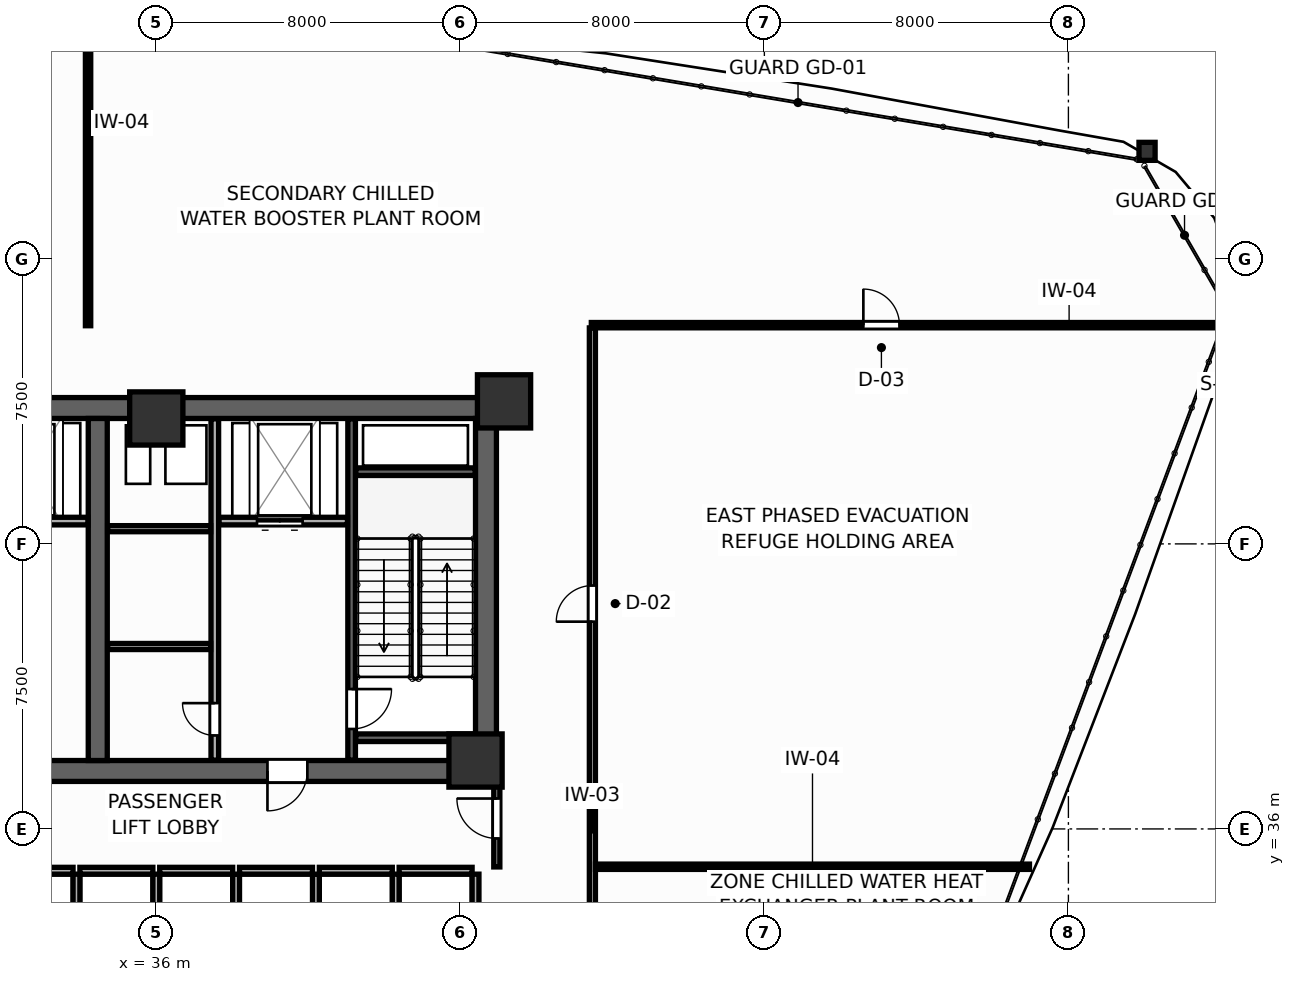
"""IFC4 building model, lengths in metres.
Left out: names, types, materials, properties, quantities, classifications, styles, units other than length and angle.
Written with IfcOpenShell. Run it as: python <this file> out.ifc"""

import sys

from ifc_helpers import new_model, si_unit, direction, frame, frame_2d, origin, origin_2d, place, context, subcontext, project, spatial, rectangle, i_section, extrude, source, transform, mapped, element, fill, save


model = new_model("IFC4")
c1 = context("Model", 3, precision=1e-05, world=origin(), true_north=direction((0.0, 1.0)))
c2 = subcontext(c1, "Body", "Model", "MODEL_VIEW")
j1 = project(units=[si_unit("LENGTHUNIT", "METRE"), si_unit("PLANEANGLEUNIT", "RADIAN")], contexts=[c1])
p1 = place(None, origin())
s1 = spatial("IfcSite", under=j1, at=p1, CompositionType="ELEMENT")
p2 = place(p1, origin())
s2 = spatial("IfcBuilding", under=s1, at=p2, CompositionType="ELEMENT")
p3 = place(p2, frame((0.0, 0.0, 59.1)))
s3 = spatial("IfcBuildingStorey", under=s2, at=p3, CompositionType="ELEMENT", Elevation=59.1)
p4 = place(p3, frame((27.05, 47.075, 0.0), z_axis=(0.0, 0.0, 1.0), x_axis=(1.0, 0.0, 0.0)))
e1 = element("IfcWall", 1, at=p4, inside=s3, PredefinedType="SHEAR", context=c2, shape_type="SweptSolid", body=[
    extrude(rectangle(XDim=17.9, YDim=0.55, at=frame_2d((8.95, 0.0))), origin(), (0.0, 0.0, 1.0), 4.8),
])
p5 = place(p3, frame((27.05, 37.525, 0.0), z_axis=(0.0, 0.0, 1.0), x_axis=(1.0, 0.0, 0.0)))
e2 = element("IfcWall", 2, at=p5, inside=s3, PredefinedType="SHEAR", context=c2, shape_type="SweptSolid", body=[
    extrude(rectangle(XDim=17.9, YDim=0.55, at=frame_2d((8.95, 0.0))), origin(), (0.0, 0.0, 1.0), 4.8),
])
p6 = place(p5, frame((4.975, 0.0, 0.0)))
e3 = element("IfcOpeningElement", 3, at=p6, cuts=e2, PredefinedType="OPENING", context=c2, shape_type="SweptSolid", body=[
    extrude(rectangle(XDim=1.05, YDim=2.1, at=frame_2d((0.525, 1.05))), frame((0.0, 0.285, 0.0), z_axis=(0.0, -1.0, 0.0), x_axis=(1.0, 0.0, 0.0)), (0.0, 0.0, 1.0), 0.57),
])
p7 = place(p5, frame((11.875, 0.0, 0.0)))
e4 = element("IfcOpeningElement", 4, at=p7, cuts=e2, PredefinedType="OPENING", context=c2, shape_type="SweptSolid", body=[
    extrude(rectangle(XDim=1.05, YDim=2.1, at=frame_2d((0.525, 1.05))), frame((0.0, 0.285, 0.0), z_axis=(0.0, -1.0, 0.0), x_axis=(1.0, 0.0, 0.0)), (0.0, 0.0, 1.0), 0.57),
])
p8 = place(p3, frame((44.675, 37.8, 0.0), z_axis=(0.0, 0.0, 1.0), x_axis=(0.0, 1.0, 0.0)))
e5 = element("IfcWall", 5, at=p8, inside=s3, PredefinedType="SHEAR", context=c2, shape_type="SweptSolid", body=[
    extrude(rectangle(XDim=9.0, YDim=0.55, at=frame_2d((4.5, 0.0))), origin(), (0.0, 0.0, 1.0), 4.8),
])
p9 = place(p3, frame((34.46, 37.8, 0.0), z_axis=(0.0, 0.0, 1.0), x_axis=(0.0, 1.0, 0.0)))
e6 = element("IfcWall", 6, at=p9, inside=s3, PredefinedType="SHEAR", context=c2, shape_type="SweptSolid", body=[
    extrude(rectangle(XDim=9.0, YDim=0.5, at=frame_2d((4.5, 0.0))), origin(), (0.0, 0.0, 1.0), 4.58),
])
m1 = source(origin(), c2, "Body", "SweptSolid", [
    extrude(rectangle(XDim=1.4, YDim=1.4, at=origin_2d()), origin(), (0.0, 0.0, 1.0), 4.8),
])
for number, where, z_axis, x_axis in (
    (7, (45.15, 47.25, 0.0), (0.0, 0.0, 1.0), (1.0, 0.0, 0.0)),
    (8, (44.4, 37.8, 0.0), (0.0, 0.0, 1.0), (1.0, 0.0, 0.0)),
    (9, (36.0, 46.8, 0.0), (0.0, 0.0, 1.0), (1.0, 0.0, 0.0)),
):
    element("IfcColumn", number, at=place(p3, frame(where, z_axis=z_axis, x_axis=x_axis)), inside=s3, PredefinedType="COLUMN", context=c2, shape_type="MappedRepresentation", body=[
        mapped(m1, transform((0.0, 0.0, 0.0), scale=1.0)),
    ])
m2 = source(origin(), c2, "Body", "SweptSolid", [
    extrude(i_section(OverallWidth=0.424, OverallDepth=0.474, WebThickness=0.045, FlangeThickness=0.072, FilletRadius=0.015, at=origin_2d()), origin(), (0.0, 0.0, 1.0), 4.8),
])
p10 = place(p3, frame((62.069, 53.829, 0.0), z_axis=(0.0, 0.0, 1.0), x_axis=(1.0, 0.0, 0.0)))
e10 = element("IfcColumn", 10, at=p10, inside=s3, PredefinedType="COLUMN", context=c2, shape_type="MappedRepresentation", body=[
    mapped(m2, transform((0.0, 0.0, 0.0), scale=1.0)),
])
p11 = place(p3, frame((41.14, 37.81, 0.0), z_axis=(0.0, 0.0, 1.0), x_axis=(0.0, 1.0, 0.0)))
e11 = element("IfcWall", 11, at=p11, inside=s3, PredefinedType="SHEAR", context=c2, shape_type="SweptSolid", body=[
    extrude(rectangle(XDim=8.98, YDim=0.2, at=frame_2d((4.49, 0.0))), origin(), (0.0, 0.0, 1.0), 4.8),
])
p12 = place(p11, frame((0.82, 0.0, 0.0)))
e12 = element("IfcOpeningElement", 12, at=p12, cuts=e11, PredefinedType="OPENING", context=c2, shape_type="SweptSolid", body=[
    extrude(rectangle(XDim=1.05, YDim=2.1, at=frame_2d((0.525, 1.05))), frame((0.0, 0.11, 0.0), z_axis=(0.0, -1.0, 0.0), x_axis=(1.0, 0.0, 0.0)), (0.0, 0.0, 1.0), 0.22),
])
for number, where, z_axis, x_axis in (
    (13, (41.25, 45.4, 0.0), (0.0, 0.0, 1.0), (1.0, 0.0, 0.0)),
    (14, (41.25, 38.4, 0.0), (0.0, 0.0, 1.0), (1.0, 0.0, 0.0)),
):
    element("IfcWall", number, at=place(p3, frame(where, z_axis=z_axis, x_axis=x_axis)), inside=s3, PredefinedType="SHEAR", context=c2, shape_type="SweptSolid", body=[
        extrude(rectangle(XDim=3.14, YDim=0.2, at=frame_2d((1.57, 0.0))), origin(), (0.0, 0.0, 1.0), 4.8),
    ])
p13 = place(p3, frame((30.97, 44.1, 0.0), z_axis=(0.0, 0.0, 1.0), x_axis=(1.0, 0.0, 0.0)))
e15 = element("IfcWall", 15, at=p13, inside=s3, PredefinedType="PARTITIONING", context=c2, shape_type="SweptSolid", body=[
    extrude(rectangle(XDim=3.23, YDim=0.2, at=frame_2d((1.615, 0.0))), origin(), (0.0, 0.0, 1.0), 4.58),
])
p14 = place(p13, frame((0.9, 0.0, 0.0)))
e16 = element("IfcOpeningElement", 16, at=p14, cuts=e15, PredefinedType="OPENING", context=c2, shape_type="SweptSolid", body=[
    extrude(rectangle(XDim=1.2, YDim=2.1, at=frame_2d((0.6, 1.05))), frame((0.0, 0.11, 0.0), z_axis=(0.0, -1.0, 0.0), x_axis=(1.0, 0.0, 0.0)), (0.0, 0.0, 1.0), 0.22),
])
p15 = place(p3, frame((37.65, 44.1, 0.0), z_axis=(0.0, 0.0, 1.0), x_axis=(1.0, 0.0, 0.0)))
e17 = element("IfcWall", 17, at=p15, inside=s3, PredefinedType="PARTITIONING", context=c2, shape_type="SweptSolid", body=[
    extrude(rectangle(XDim=3.38, YDim=0.2, at=frame_2d((1.69, 0.0))), origin(), (0.0, 0.0, 1.0), 4.58),
])
p16 = place(p15, frame((1.0, 0.0, 0.0)))
e18 = element("IfcOpeningElement", 18, at=p16, cuts=e17, PredefinedType="OPENING", context=c2, shape_type="SweptSolid", body=[
    extrude(rectangle(XDim=1.2, YDim=2.1, at=frame_2d((0.6, 1.05))), frame((0.0, 0.11, 0.0), z_axis=(0.0, -1.0, 0.0), x_axis=(1.0, 0.0, 0.0)), (0.0, 0.0, 1.0), 0.22),
])
p17 = place(p3, frame((37.54, 37.81, 0.0), z_axis=(0.0, 0.0, 1.0), x_axis=(0.0, 1.0, 0.0)))
e19 = element("IfcWall", 19, at=p17, inside=s3, PredefinedType="PARTITIONING", context=c2, shape_type="SweptSolid", body=[
    extrude(rectangle(XDim=8.98, YDim=0.2, at=frame_2d((4.49, 0.0))), origin(), (0.0, 0.0, 1.0), 4.58),
])
p18 = place(p17, frame((0.65, 0.0, 0.0)))
e20 = element("IfcOpeningElement", 20, at=p18, cuts=e19, PredefinedType="OPENING", context=c2, shape_type="SweptSolid", body=[
    extrude(rectangle(XDim=0.85, YDim=2.05, at=frame_2d((0.425, 1.025))), frame((0.0, 0.11, 0.0), z_axis=(0.0, -1.0, 0.0), x_axis=(1.0, 0.0, 0.0)), (0.0, 0.0, 1.0), 0.22),
])
for number, where, z_axis, x_axis in (
    (21, (34.72, 40.8, 0.0), (0.0, 0.0, 1.0), (1.0, 0.0, 0.0)),
    (22, (34.72, 43.9, 0.0), (0.0, 0.0, 1.0), (1.0, 0.0, 0.0)),
):
    element("IfcWall", number, at=place(p3, frame(where, z_axis=z_axis, x_axis=x_axis)), inside=s3, PredefinedType="PARTITIONING", context=c2, shape_type="SweptSolid", body=[
        extrude(rectangle(XDim=2.71, YDim=0.16, at=frame_2d((1.355, 0.0))), origin(), (0.0, 0.0, 1.0), 4.58),
    ])
p19 = place(p3, frame((31.89, 34.9, 0.0), z_axis=(0.0, 0.0, 1.0), x_axis=(1.0, 0.0, 0.0)))
e23 = element("IfcWall", 23, at=p19, inside=s3, PredefinedType="PARTITIONING", context=c2, shape_type="SweptSolid", body=[
    extrude(rectangle(XDim=1.92, YDim=0.18, at=frame_2d((0.96, 0.0))), origin(), (0.0, 0.0, 1.0), 4.58),
])
p20 = place(p3, frame((33.99, 34.9, 0.0), z_axis=(0.0, 0.0, 1.0), x_axis=(1.0, 0.0, 0.0)))
e24 = element("IfcWall", 24, at=p20, inside=s3, PredefinedType="PARTITIONING", context=c2, shape_type="SweptSolid", body=[
    extrude(rectangle(XDim=1.92, YDim=0.18, at=frame_2d((0.96, 0.0))), origin(), (0.0, 0.0, 1.0), 4.58),
])
p21 = place(p3, frame((33.9, 32.49, 0.0), z_axis=(0.0, 0.0, 1.0), x_axis=(0.0, 1.0, 0.0)))
e25 = element("IfcWall", 25, at=p21, inside=s3, PredefinedType="PARTITIONING", context=c2, shape_type="SweptSolid", body=[
    extrude(rectangle(XDim=2.32, YDim=0.18, at=frame_2d((1.16, 0.0))), origin(), (0.0, 0.0, 1.0), 4.58),
])
p22 = place(p3, frame((36.09, 34.9, 0.0), z_axis=(0.0, 0.0, 1.0), x_axis=(1.0, 0.0, 0.0)))
e26 = element("IfcWall", 26, at=p22, inside=s3, PredefinedType="PARTITIONING", context=c2, shape_type="SweptSolid", body=[
    extrude(rectangle(XDim=1.92, YDim=0.18, at=frame_2d((0.96, 0.0))), origin(), (0.0, 0.0, 1.0), 4.58),
])
p23 = place(p3, frame((36.0, 32.49, 0.0), z_axis=(0.0, 0.0, 1.0), x_axis=(0.0, 1.0, 0.0)))
e27 = element("IfcWall", 27, at=p23, inside=s3, PredefinedType="PARTITIONING", context=c2, shape_type="SweptSolid", body=[
    extrude(rectangle(XDim=2.32, YDim=0.18, at=frame_2d((1.16, 0.0))), origin(), (0.0, 0.0, 1.0), 4.58),
])
p24 = place(p3, frame((38.19, 34.9, 0.0), z_axis=(0.0, 0.0, 1.0), x_axis=(1.0, 0.0, 0.0)))
e28 = element("IfcWall", 28, at=p24, inside=s3, PredefinedType="PARTITIONING", context=c2, shape_type="SweptSolid", body=[
    extrude(rectangle(XDim=1.92, YDim=0.18, at=frame_2d((0.96, 0.0))), origin(), (0.0, 0.0, 1.0), 4.58),
])
p25 = place(p3, frame((38.1, 32.49, 0.0), z_axis=(0.0, 0.0, 1.0), x_axis=(0.0, 1.0, 0.0)))
e29 = element("IfcWall", 29, at=p25, inside=s3, PredefinedType="PARTITIONING", context=c2, shape_type="SweptSolid", body=[
    extrude(rectangle(XDim=2.32, YDim=0.18, at=frame_2d((1.16, 0.0))), origin(), (0.0, 0.0, 1.0), 4.58),
])
p26 = place(p3, frame((40.29, 34.9, 0.0), z_axis=(0.0, 0.0, 1.0), x_axis=(1.0, 0.0, 0.0)))
e30 = element("IfcWall", 30, at=p26, inside=s3, PredefinedType="PARTITIONING", context=c2, shape_type="SweptSolid", body=[
    extrude(rectangle(XDim=1.92, YDim=0.18, at=frame_2d((0.96, 0.0))), origin(), (0.0, 0.0, 1.0), 4.58),
])
p27 = place(p3, frame((40.2, 32.49, 0.0), z_axis=(0.0, 0.0, 1.0), x_axis=(0.0, 1.0, 0.0)))
e31 = element("IfcWall", 31, at=p27, inside=s3, PredefinedType="PARTITIONING", context=c2, shape_type="SweptSolid", body=[
    extrude(rectangle(XDim=2.32, YDim=0.18, at=frame_2d((1.16, 0.0))), origin(), (0.0, 0.0, 1.0), 4.58),
])
p28 = place(p3, frame((42.39, 34.9, 0.0), z_axis=(0.0, 0.0, 1.0), x_axis=(1.0, 0.0, 0.0)))
e32 = element("IfcWall", 32, at=p28, inside=s3, PredefinedType="PARTITIONING", context=c2, shape_type="SweptSolid", body=[
    extrude(rectangle(XDim=1.92, YDim=0.18, at=frame_2d((0.96, 0.0))), origin(), (0.0, 0.0, 1.0), 4.58),
])
for number, where, z_axis, x_axis in (
    (33, (42.3, 32.49, 0.0), (0.0, 0.0, 1.0), (0.0, 1.0, 0.0)),
    (34, (44.4, 32.49, 0.0), (0.0, 0.0, 1.0), (0.0, 1.0, 0.0)),
):
    element("IfcWall", number, at=place(p3, frame(where, z_axis=z_axis, x_axis=x_axis)), inside=s3, PredefinedType="PARTITIONING", context=c2, shape_type="SweptSolid", body=[
        extrude(rectangle(XDim=2.32, YDim=0.18, at=frame_2d((1.16, 0.0))), origin(), (0.0, 0.0, 1.0), 4.58),
    ])
p29 = place(p3, frame((44.96, 35.0, 0.0), z_axis=(0.0, 0.0, 1.0), x_axis=(0.0, 1.0, 0.0)))
e35 = element("IfcWall", 35, at=p29, inside=s3, PredefinedType="PARTITIONING", context=c2, shape_type="SweptSolid", body=[
    extrude(rectangle(XDim=2.65, YDim=0.16, at=frame_2d((1.325, 0.0))), origin(), (0.0, 0.0, 1.0), 4.58),
])
p30 = place(p29, frame((0.75, 0.0, 0.0)))
e36 = element("IfcOpeningElement", 36, at=p30, cuts=e35, PredefinedType="OPENING", context=c2, shape_type="SweptSolid", body=[
    extrude(rectangle(XDim=1.05, YDim=2.1, at=frame_2d((0.525, 1.05))), frame((0.0, 0.09, 0.0), z_axis=(0.0, -1.0, 0.0), x_axis=(1.0, 0.0, 0.0)), (0.0, 0.0, 1.0), 0.18),
])
p31 = place(p3, frame((47.475, 30.72, 0.0), z_axis=(0.0, 0.0, 1.0), x_axis=(0.0, 1.0, 0.0)))
e37 = element("IfcWall", 37, at=p31, inside=s3, PredefinedType="PARTITIONING", context=c2, shape_type="SweptSolid", body=[
    extrude(rectangle(XDim=18.463, YDim=0.16, at=frame_2d((9.231, 0.0))), origin(), (0.0, 0.0, 1.0), 4.58),
])
p32 = place(p31, frame((10.734, 0.0, 0.0)))
e38 = element("IfcOpeningElement", 38, at=p32, cuts=e37, PredefinedType="OPENING", context=c2, shape_type="SweptSolid", body=[
    extrude(rectangle(XDim=0.95, YDim=2.05, at=frame_2d((0.475, 1.025))), frame((0.0, 0.09, 0.0), z_axis=(0.0, -1.0, 0.0), x_axis=(1.0, 0.0, 0.0)), (0.0, 0.0, 1.0), 0.18),
])
p33 = place(p3, frame((47.447, 49.255, 0.0), z_axis=(0.0, 0.0, 1.0), x_axis=(1.0, 0.0, 0.0)))
e39 = element("IfcWall", 39, at=p33, inside=s3, PredefinedType="PARTITIONING", context=c2, shape_type="SweptSolid", body=[
    extrude(rectangle(XDim=16.855, YDim=0.14, at=frame_2d((8.428, 0.0))), origin(), (0.0, 0.0, 1.0), 2.57),
])
p34 = place(p33, frame((7.158, 0.0, 0.0)))
e40 = element("IfcOpeningElement", 40, at=p34, cuts=e39, PredefinedType="OPENING", context=c2, shape_type="SweptSolid", body=[
    extrude(rectangle(XDim=0.95, YDim=2.05, at=frame_2d((0.475, 1.025))), frame((0.0, 0.08, 0.0), z_axis=(0.0, -1.0, 0.0), x_axis=(1.0, 0.0, 0.0)), (0.0, 0.0, 1.0), 0.16),
])
p35 = place(p3, frame((47.557, 35.005, 0.0), z_axis=(0.0, 0.0, 1.0), x_axis=(1.0, 0.0, 0.0)))
e41 = element("IfcWall", 41, at=p35, inside=s3, PredefinedType="PARTITIONING", context=c2, shape_type="SweptSolid", body=[
    extrude(rectangle(XDim=11.419, YDim=0.14, at=frame_2d((5.709, 0.0))), origin(), (0.0, 0.0, 1.0), 4.58),
])
p36 = place(p3, frame((34.205, 49.24, 0.0), z_axis=(0.0, 0.0, 1.0), x_axis=(0.0, 1.0, 0.0)))
e42 = element("IfcWall", 42, at=p36, inside=s3, PredefinedType="PARTITIONING", context=c2, shape_type="SweptSolid", body=[
    extrude(rectangle(XDim=7.629, YDim=0.14, at=frame_2d((3.815, 0.0))), origin(), (0.0, 0.0, 1.0), 4.58),
])
p37 = place(p12, frame((1.05, 0.0, 0.0), z_axis=(0.0, 0.0, 1.0), x_axis=(-1.0, 0.0, 0.0)))
e43 = element("IfcDoor", 43, at=p37, inside=s3, OperationType="SINGLE_SWING_LEFT", PredefinedType="DOOR", context=c2, shape_type="SweptSolid", body=[
    extrude(rectangle(XDim=1.05, YDim=2.1, at=frame_2d((0.525, 1.05))), frame((0.0, 0.025, 0.0), z_axis=(0.0, -1.0, 0.0), x_axis=(1.0, 0.0, 0.0)), (0.0, 0.0, 1.0), 0.05),
])
fill(e12, e43)
p38 = place(p16, origin())
e44 = element("IfcDoor", 44, at=p38, inside=s3, OperationType="DOUBLE_DOOR_SLIDING", PredefinedType="DOOR", context=c2, shape_type="SweptSolid", body=[
    extrude(rectangle(XDim=1.2, YDim=2.1, at=frame_2d((0.6, 1.05))), frame((0.0, 0.025, 0.0), z_axis=(0.0, -1.0, 0.0), x_axis=(1.0, 0.0, 0.0)), (0.0, 0.0, 1.0), 0.05),
])
fill(e18, e44)
p39 = place(p18, origin())
e45 = element("IfcDoor", 45, at=p39, inside=s3, OperationType="SINGLE_SWING_RIGHT", PredefinedType="DOOR", context=c2, shape_type="SweptSolid", body=[
    extrude(rectangle(XDim=0.85, YDim=2.05, at=frame_2d((0.425, 1.025))), frame((0.0, 0.025, 0.0), z_axis=(0.0, -1.0, 0.0), x_axis=(1.0, 0.0, 0.0)), (0.0, 0.0, 1.0), 0.05),
])
fill(e20, e45)
p40 = place(p30, origin())
e46 = element("IfcDoor", 46, at=p40, inside=s3, OperationType="SINGLE_SWING_RIGHT", PredefinedType="DOOR", context=c2, shape_type="SweptSolid", body=[
    extrude(rectangle(XDim=1.05, YDim=2.1, at=frame_2d((0.525, 1.05))), frame((0.0, 0.025, 0.0), z_axis=(0.0, -1.0, 0.0), x_axis=(1.0, 0.0, 0.0)), (0.0, 0.0, 1.0), 0.05),
])
fill(e36, e46)
p41 = place(p32, origin())
e47 = element("IfcDoor", 47, at=p41, inside=s3, OperationType="SINGLE_SWING_LEFT", PredefinedType="DOOR", context=c2, shape_type="SweptSolid", body=[
    extrude(rectangle(XDim=0.95, YDim=2.05, at=frame_2d((0.475, 1.025))), frame((0.0, 0.025, 0.0), z_axis=(0.0, -1.0, 0.0), x_axis=(1.0, 0.0, 0.0)), (0.0, 0.0, 1.0), 0.05),
])
fill(e38, e47)
p42 = place(p34, origin())
e48 = element("IfcDoor", 48, at=p42, inside=s3, OperationType="SINGLE_SWING_LEFT", PredefinedType="DOOR", context=c2, shape_type="SweptSolid", body=[
    extrude(rectangle(XDim=0.95, YDim=2.05, at=frame_2d((0.475, 1.025))), frame((0.0, 0.025, 0.0), z_axis=(0.0, -1.0, 0.0), x_axis=(1.0, 0.0, 0.0)), (0.0, 0.0, 1.0), 0.05),
])
fill(e40, e48)
p43 = place(p7, frame((1.05, 0.0, 0.0), z_axis=(0.0, 0.0, 1.0), x_axis=(-1.0, 0.0, 0.0)))
e49 = element("IfcDoor", 49, at=p43, inside=s3, OperationType="SINGLE_SWING_RIGHT", PredefinedType="DOOR", context=c2, shape_type="SweptSolid", body=[
    extrude(rectangle(XDim=1.05, YDim=2.1, at=frame_2d((0.525, 1.05))), frame((0.0, 0.025, 0.0), z_axis=(0.0, -1.0, 0.0), x_axis=(1.0, 0.0, 0.0)), (0.0, 0.0, 1.0), 0.05),
])
fill(e4, e49)
save(model, sys.argv[1])
